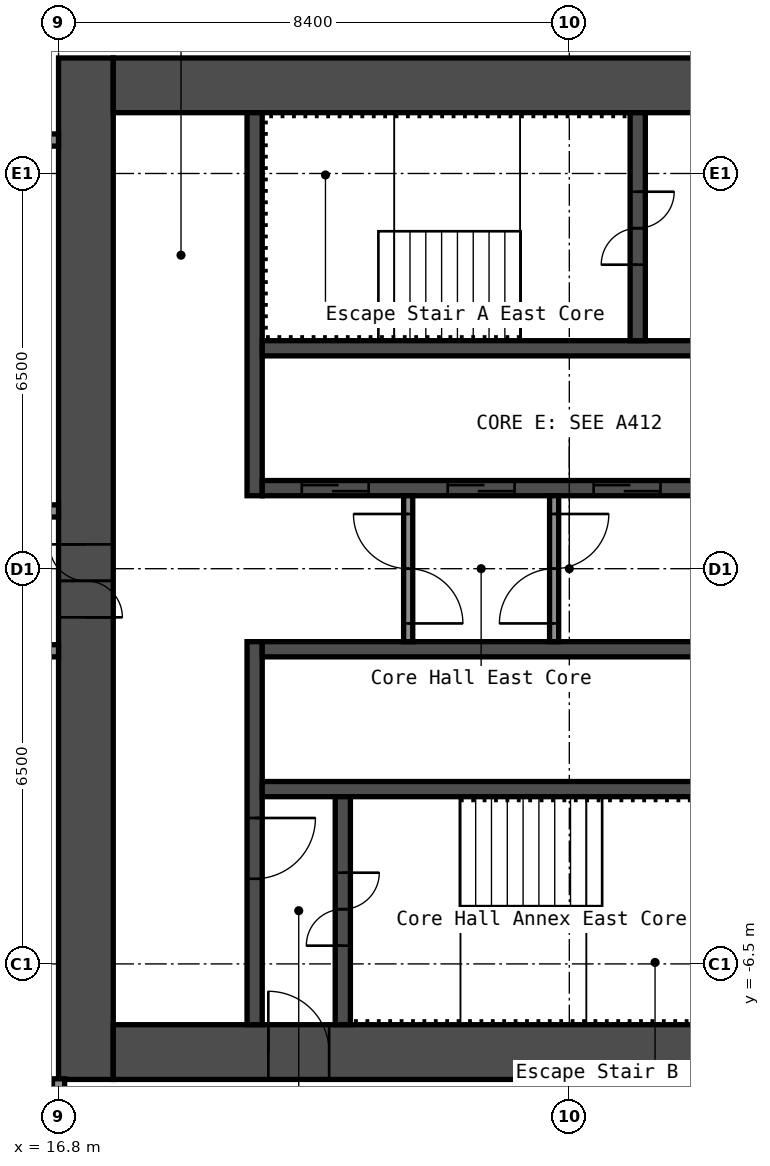
"""IFC4 building model, lengths in metres.
Left out: names, types, materials, properties, quantities, classifications, styles, units other than length and angle.
Written with IfcOpenShell. Run it as: python <this file> out.ifc"""

import sys

from ifc_helpers import new_model, si_unit, direction, frame, frame_2d, origin, place, context, subcontext, project, spatial, rectangle, extrude, element, fill, save


model = new_model("IFC4")
c1 = context("Model", 3, precision=1e-05, world=origin(), true_north=direction((0.0, 1.0)))
c2 = subcontext(c1, "Body", "Model", "MODEL_VIEW")
j1 = project(units=[si_unit("LENGTHUNIT", "METRE"), si_unit("PLANEANGLEUNIT", "RADIAN")], contexts=[c1])
p1 = place(None, origin())
s1 = spatial("IfcSite", under=j1, at=p1, CompositionType="ELEMENT")
p2 = place(p1, origin())
s2 = spatial("IfcBuilding", under=s1, at=p2, CompositionType="ELEMENT")
p3 = place(p2, frame((0.0, 0.0, 75.4)))
s3 = spatial("IfcBuildingStorey", under=s2, at=p3, CompositionType="ELEMENT", Elevation=75.4)
p4 = place(p3, frame((17.25, -8.4, 0.0), z_axis=(0.0, 0.0, 1.0), x_axis=(0.0, 1.0, 0.0)))
e1 = element("IfcWall", 1, at=p4, inside=s3, PredefinedType="SHEAR", context=c2, shape_type="SweptSolid", body=[
    extrude(rectangle(XDim=16.8, YDim=0.9, at=frame_2d((8.4, 0.0))), origin(), (0.0, 0.0, 1.0), 2.8),
])
p5 = place(p4, frame((7.6, 0.0, 0.0)))
e2 = element("IfcOpeningElement", 2, at=p5, cuts=e1, PredefinedType="OPENING", context=c2, shape_type="SweptSolid", body=[
    extrude(rectangle(XDim=1.2, YDim=2.1, at=frame_2d((0.6, 1.05))), frame((0.0, 0.46, 0.0), z_axis=(0.0, -1.0, 0.0), x_axis=(1.0, 0.0, 0.0)), (0.0, 0.0, 1.0), 0.92),
])
p6 = place(p3, frame((17.7, 7.95, 0.0), z_axis=(0.0, 0.0, 1.0), x_axis=(1.0, 0.0, 0.0)))
e3 = element("IfcWall", 3, at=p6, inside=s3, PredefinedType="SHEAR", context=c2, shape_type="SweptSolid", body=[
    extrude(rectangle(XDim=15.0, YDim=0.9, at=frame_2d((7.5, 0.0))), origin(), (0.0, 0.0, 1.0), 2.8),
])
p7 = place(p6, frame((10.4, 0.0, 0.0)))
e4 = element("IfcOpeningElement", 4, at=p7, cuts=e3, PredefinedType="OPENING", context=c2, shape_type="SweptSolid", body=[
    extrude(rectangle(XDim=1.2, YDim=2.1, at=frame_2d((0.6, 1.05))), frame((0.0, 0.46, 0.0), z_axis=(0.0, -1.0, 0.0), x_axis=(1.0, 0.0, 0.0)), (0.0, 0.0, 1.0), 0.92),
])
p8 = place(p6, frame((13.35, 0.0, 0.0)))
e5 = element("IfcOpeningElement", 5, at=p8, cuts=e3, PredefinedType="OPENING", context=c2, shape_type="SweptSolid", body=[
    extrude(rectangle(XDim=0.9, YDim=2.1, at=frame_2d((0.45, 1.05))), frame((0.0, 0.46, 0.0), z_axis=(0.0, -1.0, 0.0), x_axis=(1.0, 0.0, 0.0)), (0.0, 0.0, 1.0), 0.92),
])
p9 = place(p3, frame((17.7, -7.95, 0.0), z_axis=(0.0, 0.0, 1.0), x_axis=(1.0, 0.0, 0.0)))
e6 = element("IfcWall", 6, at=p9, inside=s3, PredefinedType="SHEAR", context=c2, shape_type="SweptSolid", body=[
    extrude(rectangle(XDim=15.0, YDim=0.9, at=frame_2d((7.5, 0.0))), origin(), (0.0, 0.0, 1.0), 2.8),
])
p10 = place(p9, frame((2.55, 0.0, 0.0)))
e7 = element("IfcOpeningElement", 7, at=p10, cuts=e6, PredefinedType="OPENING", context=c2, shape_type="SweptSolid", body=[
    extrude(rectangle(XDim=1.0, YDim=2.1, at=frame_2d((0.5, 1.05))), frame((0.0, 0.46, 0.0), z_axis=(0.0, -1.0, 0.0), x_axis=(1.0, 0.0, 0.0)), (0.0, 0.0, 1.0), 0.92),
])
p11 = place(p3, frame((20.025, 1.2, 0.0), z_axis=(0.0, 0.0, 1.0), x_axis=(0.0, 1.0, 0.0)))
e8 = element("IfcWall", 8, at=p11, inside=s3, PredefinedType="SHEAR", context=c2, shape_type="SweptSolid", body=[
    extrude(rectangle(XDim=6.3, YDim=0.25, at=frame_2d((3.15, 0.0))), origin(), (0.0, 0.0, 1.0), 2.8),
])
p12 = place(p3, frame((20.025, -7.5, 0.0), z_axis=(0.0, 0.0, 1.0), x_axis=(0.0, 1.0, 0.0)))
e9 = element("IfcWall", 9, at=p12, inside=s3, PredefinedType="SHEAR", context=c2, shape_type="SweptSolid", body=[
    extrude(rectangle(XDim=6.3, YDim=0.25, at=frame_2d((3.15, 0.0))), origin(), (0.0, 0.0, 1.0), 2.8),
])
p13 = place(p12, frame((2.4, 0.0, 0.0)))
e10 = element("IfcOpeningElement", 10, at=p13, cuts=e9, PredefinedType="OPENING", context=c2, shape_type="SweptSolid", body=[
    extrude(rectangle(XDim=1.0, YDim=2.1, at=frame_2d((0.5, 1.05))), frame((0.0, 0.135, 0.0), z_axis=(0.0, -1.0, 0.0), x_axis=(1.0, 0.0, 0.0)), (0.0, 0.0, 1.0), 0.27),
])
p14 = place(p3, frame((20.15, 1.325, 0.0), z_axis=(0.0, 0.0, 1.0), x_axis=(1.0, 0.0, 0.0)))
e11 = element("IfcWall", 11, at=p14, inside=s3, PredefinedType="SHEAR", context=c2, shape_type="SweptSolid", body=[
    extrude(rectangle(XDim=7.5, YDim=0.25, at=frame_2d((3.75, 0.0))), origin(), (0.0, 0.0, 1.0), 2.8),
])
p15 = place(p14, frame((0.65, 0.0, 0.0)))
e12 = element("IfcOpeningElement", 12, at=p15, cuts=e11, PredefinedType="OPENING", context=c2, shape_type="SweptSolid", body=[
    extrude(rectangle(XDim=1.1, YDim=2.1, at=frame_2d((0.55, 1.05))), frame((0.0, 0.135, 0.0), z_axis=(0.0, -1.0, 0.0), x_axis=(1.0, 0.0, 0.0)), (0.0, 0.0, 1.0), 0.27),
])
p16 = place(p14, frame((3.05, 0.0, 0.0)))
e13 = element("IfcOpeningElement", 13, at=p16, cuts=e11, PredefinedType="OPENING", context=c2, shape_type="SweptSolid", body=[
    extrude(rectangle(XDim=1.1, YDim=2.1, at=frame_2d((0.55, 1.05))), frame((0.0, 0.135, 0.0), z_axis=(0.0, -1.0, 0.0), x_axis=(1.0, 0.0, 0.0)), (0.0, 0.0, 1.0), 0.27),
])
p17 = place(p14, frame((5.45, 0.0, 0.0)))
e14 = element("IfcOpeningElement", 14, at=p17, cuts=e11, PredefinedType="OPENING", context=c2, shape_type="SweptSolid", body=[
    extrude(rectangle(XDim=1.1, YDim=2.1, at=frame_2d((0.55, 1.05))), frame((0.0, 0.135, 0.0), z_axis=(0.0, -1.0, 0.0), x_axis=(1.0, 0.0, 0.0)), (0.0, 0.0, 1.0), 0.27),
])
p18 = place(p3, frame((20.15, 3.625, 0.0), z_axis=(0.0, 0.0, 1.0), x_axis=(1.0, 0.0, 0.0)))
e15 = element("IfcWall", 15, at=p18, inside=s3, PredefinedType="SHEAR", context=c2, shape_type="SweptSolid", body=[
    extrude(rectangle(XDim=7.5, YDim=0.25, at=frame_2d((3.75, 0.0))), origin(), (0.0, 0.0, 1.0), 2.8),
])
p19 = place(p3, frame((26.325, 3.75, 0.0), z_axis=(0.0, 0.0, 1.0), x_axis=(0.0, 1.0, 0.0)))
e16 = element("IfcWall", 16, at=p19, inside=s3, PredefinedType="SHEAR", context=c2, shape_type="SweptSolid", body=[
    extrude(rectangle(XDim=3.75, YDim=0.25, at=frame_2d((1.875, 0.0))), origin(), (0.0, 0.0, 1.0), 2.8),
])
p20 = place(p19, frame((1.25, 0.0, 0.0)))
e17 = element("IfcOpeningElement", 17, at=p20, cuts=e16, PredefinedType="OPENING", context=c2, shape_type="SweptSolid", body=[
    extrude(rectangle(XDim=1.2, YDim=2.1, at=frame_2d((0.6, 1.05))), frame((0.0, 0.135, 0.0), z_axis=(0.0, -1.0, 0.0), x_axis=(1.0, 0.0, 0.0)), (0.0, 0.0, 1.0), 0.27),
])
for number, where, z_axis, x_axis in (
    (18, (20.15, -1.325, 0.0), (0.0, 0.0, 1.0), (1.0, 0.0, 0.0)),
    (19, (20.15, -3.625, 0.0), (0.0, 0.0, 1.0), (1.0, 0.0, 0.0)),
):
    element("IfcWall", number, at=place(p3, frame(where, z_axis=z_axis, x_axis=x_axis)), inside=s3, PredefinedType="SHEAR", context=c2, shape_type="SweptSolid", body=[
        extrude(rectangle(XDim=7.5, YDim=0.25, at=frame_2d((3.75, 0.0))), origin(), (0.0, 0.0, 1.0), 2.8),
    ])
p21 = place(p3, frame((21.475, -7.5, 0.0), z_axis=(0.0, 0.0, 1.0), x_axis=(0.0, 1.0, 0.0)))
e20 = element("IfcWall", 20, at=p21, inside=s3, PredefinedType="SHEAR", context=c2, shape_type="SweptSolid", body=[
    extrude(rectangle(XDim=3.75, YDim=0.25, at=frame_2d((1.875, 0.0))), origin(), (0.0, 0.0, 1.0), 2.8),
])
p22 = place(p21, frame((1.3, 0.0, 0.0)))
e21 = element("IfcOpeningElement", 21, at=p22, cuts=e20, PredefinedType="OPENING", context=c2, shape_type="SweptSolid", body=[
    extrude(rectangle(XDim=1.2, YDim=2.1, at=frame_2d((0.6, 1.05))), frame((0.0, 0.135, 0.0), z_axis=(0.0, -1.0, 0.0), x_axis=(1.0, 0.0, 0.0)), (0.0, 0.0, 1.0), 0.27),
])
p23 = place(p3, frame((22.55, -1.2, 0.0), z_axis=(0.0, 0.0, 1.0), x_axis=(0.0, 1.0, 0.0)))
e22 = element("IfcWall", 22, at=p23, inside=s3, PredefinedType="PARTITIONING", context=c2, shape_type="SweptSolid", body=[
    extrude(rectangle(XDim=2.4, YDim=0.15, at=frame_2d((1.2, 0.0))), origin(), (0.0, 0.0, 1.0), 2.8),
])
p24 = place(p23, frame((0.3, 0.0, 0.0)))
e23 = element("IfcOpeningElement", 23, at=p24, cuts=e22, PredefinedType="OPENING", context=c2, shape_type="SweptSolid", body=[
    extrude(rectangle(XDim=1.8, YDim=2.1, at=frame_2d((0.9, 1.05))), frame((0.0, 0.085, 0.0), z_axis=(0.0, -1.0, 0.0), x_axis=(1.0, 0.0, 0.0)), (0.0, 0.0, 1.0), 0.17),
])
p25 = place(p3, frame((24.95, -1.2, 0.0), z_axis=(0.0, 0.0, 1.0), x_axis=(0.0, 1.0, 0.0)))
e24 = element("IfcWall", 24, at=p25, inside=s3, PredefinedType="PARTITIONING", context=c2, shape_type="SweptSolid", body=[
    extrude(rectangle(XDim=2.4, YDim=0.15, at=frame_2d((1.2, 0.0))), origin(), (0.0, 0.0, 1.0), 2.8),
])
p26 = place(p25, frame((0.3, 0.0, 0.0)))
e25 = element("IfcOpeningElement", 25, at=p26, cuts=e24, PredefinedType="OPENING", context=c2, shape_type="SweptSolid", body=[
    extrude(rectangle(XDim=1.8, YDim=2.1, at=frame_2d((0.9, 1.05))), frame((0.0, 0.085, 0.0), z_axis=(0.0, -1.0, 0.0), x_axis=(1.0, 0.0, 0.0)), (0.0, 0.0, 1.0), 0.17),
])
p27 = place(p3, frame((-16.8, -1.35, 0.0), z_axis=(0.0, 0.0, 1.0), x_axis=(1.0, 0.0, 0.0)))
e26 = element("IfcWall", 26, at=p27, inside=s3, PredefinedType="PARTITIONING", context=c2, shape_type="SweptSolid", body=[
    extrude(rectangle(XDim=33.6, YDim=0.2, at=frame_2d((16.8, 0.0))), origin(), (0.0, 0.0, 1.0), 2.8),
])
p28 = place(p27, frame((1.9, 0.0, 0.0)))
e27 = element("IfcOpeningElement", 27, at=p28, cuts=e26, PredefinedType="OPENING", context=c2, shape_type="SweptSolid", body=[
    extrude(rectangle(XDim=1.0, YDim=2.1, at=frame_2d((0.5, 1.05))), frame((0.0, 0.11, 0.0), z_axis=(0.0, -1.0, 0.0), x_axis=(1.0, 0.0, 0.0)), (0.0, 0.0, 1.0), 0.22),
])
p29 = place(p27, frame((9.63, 0.0, 0.0)))
e28 = element("IfcOpeningElement", 28, at=p29, cuts=e26, PredefinedType="OPENING", context=c2, shape_type="SweptSolid", body=[
    extrude(rectangle(XDim=0.9, YDim=2.1, at=frame_2d((0.45, 1.05))), frame((0.0, 0.11, 0.0), z_axis=(0.0, -1.0, 0.0), x_axis=(1.0, 0.0, 0.0)), (0.0, 0.0, 1.0), 0.22),
])
p30 = place(p27, frame((13.83, 0.0, 0.0)))
e29 = element("IfcOpeningElement", 29, at=p30, cuts=e26, PredefinedType="OPENING", context=c2, shape_type="SweptSolid", body=[
    extrude(rectangle(XDim=0.9, YDim=2.1, at=frame_2d((0.45, 1.05))), frame((0.0, 0.11, 0.0), z_axis=(0.0, -1.0, 0.0), x_axis=(1.0, 0.0, 0.0)), (0.0, 0.0, 1.0), 0.22),
])
p31 = place(p27, frame((22.2, 0.0, 0.0)))
e30 = element("IfcOpeningElement", 30, at=p31, cuts=e26, PredefinedType="OPENING", context=c2, shape_type="SweptSolid", body=[
    extrude(rectangle(XDim=1.0, YDim=2.1, at=frame_2d((0.5, 1.05))), frame((0.0, 0.11, 0.0), z_axis=(0.0, -1.0, 0.0), x_axis=(1.0, 0.0, 0.0)), (0.0, 0.0, 1.0), 0.22),
])
p32 = place(p27, frame((30.6, 0.0, 0.0)))
e31 = element("IfcOpeningElement", 31, at=p32, cuts=e26, PredefinedType="OPENING", context=c2, shape_type="SweptSolid", body=[
    extrude(rectangle(XDim=1.0, YDim=2.1, at=frame_2d((0.5, 1.05))), frame((0.0, 0.11, 0.0), z_axis=(0.0, -1.0, 0.0), x_axis=(1.0, 0.0, 0.0)), (0.0, 0.0, 1.0), 0.22),
])
p33 = place(p3, frame((-16.8, 0.95, 0.0), z_axis=(0.0, 0.0, 1.0), x_axis=(1.0, 0.0, 0.0)))
e32 = element("IfcWall", 32, at=p33, inside=s3, PredefinedType="PARTITIONING", context=c2, shape_type="SweptSolid", body=[
    extrude(rectangle(XDim=33.6, YDim=0.2, at=frame_2d((16.8, 0.0))), origin(), (0.0, 0.0, 1.0), 2.8),
])
p34 = place(p33, frame((10.22, 0.0, 0.0)))
e33 = element("IfcOpeningElement", 33, at=p34, cuts=e32, PredefinedType="OPENING", context=c2, shape_type="SweptSolid", body=[
    extrude(rectangle(XDim=0.9, YDim=2.1, at=frame_2d((0.45, 1.05))), frame((0.0, 0.11, 0.0), z_axis=(0.0, -1.0, 0.0), x_axis=(1.0, 0.0, 0.0)), (0.0, 0.0, 1.0), 0.22),
])
p35 = place(p33, frame((14.42, 0.0, 0.0)))
e34 = element("IfcOpeningElement", 34, at=p35, cuts=e32, PredefinedType="OPENING", context=c2, shape_type="SweptSolid", body=[
    extrude(rectangle(XDim=0.9, YDim=2.1, at=frame_2d((0.45, 1.05))), frame((0.0, 0.11, 0.0), z_axis=(0.0, -1.0, 0.0), x_axis=(1.0, 0.0, 0.0)), (0.0, 0.0, 1.0), 0.22),
])
p36 = place(p33, frame((27.27, 0.0, 0.0)))
e35 = element("IfcOpeningElement", 35, at=p36, cuts=e32, PredefinedType="OPENING", context=c2, shape_type="SweptSolid", body=[
    extrude(rectangle(XDim=0.9, YDim=2.1, at=frame_2d((0.45, 1.05))), frame((0.0, 0.11, 0.0), z_axis=(0.0, -1.0, 0.0), x_axis=(1.0, 0.0, 0.0)), (0.0, 0.0, 1.0), 0.22),
])
p37 = place(p33, frame((31.47, 0.0, 0.0)))
e36 = element("IfcOpeningElement", 36, at=p37, cuts=e32, PredefinedType="OPENING", context=c2, shape_type="SweptSolid", body=[
    extrude(rectangle(XDim=0.9, YDim=2.1, at=frame_2d((0.45, 1.05))), frame((0.0, 0.11, 0.0), z_axis=(0.0, -1.0, 0.0), x_axis=(1.0, 0.0, 0.0)), (0.0, 0.0, 1.0), 0.22),
])
p38 = place(p3, frame((-16.8, 7.05, 0.0), z_axis=(0.0, 0.0, 1.0), x_axis=(1.0, 0.0, 0.0)))
e37 = element("IfcWall", 37, at=p38, inside=s3, PredefinedType="PARTITIONING", context=c2, shape_type="SweptSolid", body=[
    extrude(rectangle(XDim=33.6, YDim=0.2, at=frame_2d((16.8, 0.0))), origin(), (0.0, 0.0, 1.0), 2.8),
])
p39 = place(p38, frame((2.155, 0.0, 0.0)))
e38 = element("IfcOpeningElement", 38, at=p39, cuts=e37, PredefinedType="OPENING", context=c2, shape_type="SweptSolid", body=[
    extrude(rectangle(XDim=0.9, YDim=2.1, at=frame_2d((0.45, 1.05))), frame((0.0, 0.11, 0.0), z_axis=(0.0, -1.0, 0.0), x_axis=(1.0, 0.0, 0.0)), (0.0, 0.0, 1.0), 0.22),
])
p40 = place(p38, frame((6.355, 0.0, 0.0)))
e39 = element("IfcOpeningElement", 39, at=p40, cuts=e37, PredefinedType="OPENING", context=c2, shape_type="SweptSolid", body=[
    extrude(rectangle(XDim=0.9, YDim=2.1, at=frame_2d((0.45, 1.05))), frame((0.0, 0.11, 0.0), z_axis=(0.0, -1.0, 0.0), x_axis=(1.0, 0.0, 0.0)), (0.0, 0.0, 1.0), 0.22),
])
p41 = place(p38, frame((18.28, 0.0, 0.0)))
e40 = element("IfcOpeningElement", 40, at=p41, cuts=e37, PredefinedType="OPENING", context=c2, shape_type="SweptSolid", body=[
    extrude(rectangle(XDim=0.9, YDim=2.1, at=frame_2d((0.45, 1.05))), frame((0.0, 0.11, 0.0), z_axis=(0.0, -1.0, 0.0), x_axis=(1.0, 0.0, 0.0)), (0.0, 0.0, 1.0), 0.22),
])
p42 = place(p38, frame((22.48, 0.0, 0.0)))
e41 = element("IfcOpeningElement", 41, at=p42, cuts=e37, PredefinedType="OPENING", context=c2, shape_type="SweptSolid", body=[
    extrude(rectangle(XDim=0.9, YDim=2.1, at=frame_2d((0.45, 1.05))), frame((0.0, 0.11, 0.0), z_axis=(0.0, -1.0, 0.0), x_axis=(1.0, 0.0, 0.0)), (0.0, 0.0, 1.0), 0.22),
])
p43 = place(p3, frame((16.8, -15.55, 0.0), z_axis=(0.0, 0.0, 1.0), x_axis=(0.0, 1.0, 0.0)))
e42 = element("IfcWall", 42, at=p43, inside=s3, PredefinedType="PARTITIONING", context=c2, shape_type="SweptSolid", body=[
    extrude(rectangle(XDim=7.16, YDim=0.2, at=frame_2d((3.58, 0.0))), origin(), (0.0, 0.0, 1.0), 2.8),
])
p44 = place(p5, origin())
e43 = element("IfcDoor", 43, at=p44, inside=s3, OperationType="DOUBLE_DOOR_SINGLE_SWING", PredefinedType="DOOR", context=c2, shape_type="SweptSolid", body=[
    extrude(rectangle(XDim=1.2, YDim=2.1, at=frame_2d((0.6, 1.05))), frame((0.0, 0.025, 0.0), z_axis=(0.0, -1.0, 0.0), x_axis=(1.0, 0.0, 0.0)), (0.0, 0.0, 1.0), 0.05),
])
fill(e2, e43)
p45 = place(p10, origin())
e44 = element("IfcDoor", 44, at=p45, inside=s3, OperationType="SINGLE_SWING_RIGHT", PredefinedType="DOOR", context=c2, shape_type="SweptSolid", body=[
    extrude(rectangle(XDim=1.0, YDim=2.1, at=frame_2d((0.5, 1.05))), frame((0.0, 0.025, 0.0), z_axis=(0.0, -1.0, 0.0), x_axis=(1.0, 0.0, 0.0)), (0.0, 0.0, 1.0), 0.05),
])
fill(e7, e44)
p46 = place(p20, origin())
e45 = element("IfcDoor", 45, at=p46, inside=s3, OperationType="DOUBLE_DOOR_SINGLE_SWING", PredefinedType="DOOR", context=c2, shape_type="SweptSolid", body=[
    extrude(rectangle(XDim=1.2, YDim=2.1, at=frame_2d((0.6, 1.05))), frame((0.0, 0.025, 0.0), z_axis=(0.0, -1.0, 0.0), x_axis=(1.0, 0.0, 0.0)), (0.0, 0.0, 1.0), 0.05),
])
fill(e17, e45)
p47 = place(p22, origin())
e46 = element("IfcDoor", 46, at=p47, inside=s3, OperationType="DOUBLE_DOOR_SINGLE_SWING", PredefinedType="DOOR", context=c2, shape_type="SweptSolid", body=[
    extrude(rectangle(XDim=1.2, YDim=2.1, at=frame_2d((0.6, 1.05))), frame((0.0, 0.025, 0.0), z_axis=(0.0, -1.0, 0.0), x_axis=(1.0, 0.0, 0.0)), (0.0, 0.0, 1.0), 0.05),
])
fill(e21, e46)
p48 = place(p13, origin())
e47 = element("IfcDoor", 47, at=p48, inside=s3, OperationType="SINGLE_SWING_RIGHT", PredefinedType="DOOR", context=c2, shape_type="SweptSolid", body=[
    extrude(rectangle(XDim=1.0, YDim=2.1, at=frame_2d((0.5, 1.05))), frame((0.0, 0.025, 0.0), z_axis=(0.0, -1.0, 0.0), x_axis=(1.0, 0.0, 0.0)), (0.0, 0.0, 1.0), 0.05),
])
fill(e10, e47)
p49 = place(p24, origin())
e48 = element("IfcDoor", 48, at=p49, inside=s3, OperationType="DOUBLE_DOOR_SINGLE_SWING", PredefinedType="DOOR", context=c2, shape_type="SweptSolid", body=[
    extrude(rectangle(XDim=1.8, YDim=2.1, at=frame_2d((0.9, 1.05))), frame((0.0, 0.025, 0.0), z_axis=(0.0, -1.0, 0.0), x_axis=(1.0, 0.0, 0.0)), (0.0, 0.0, 1.0), 0.05),
])
fill(e23, e48)
p50 = place(p26, origin())
e49 = element("IfcDoor", 49, at=p50, inside=s3, OperationType="DOUBLE_DOOR_SINGLE_SWING", PredefinedType="DOOR", context=c2, shape_type="SweptSolid", body=[
    extrude(rectangle(XDim=1.8, YDim=2.1, at=frame_2d((0.9, 1.05))), frame((0.0, 0.025, 0.0), z_axis=(0.0, -1.0, 0.0), x_axis=(1.0, 0.0, 0.0)), (0.0, 0.0, 1.0), 0.05),
])
fill(e25, e49)
p51 = place(p15, origin())
e50 = element("IfcDoor", 50, at=p51, inside=s3, OperationType="DOUBLE_DOOR_SLIDING", PredefinedType="DOOR", context=c2, shape_type="SweptSolid", body=[
    extrude(rectangle(XDim=1.1, YDim=2.1, at=frame_2d((0.55, 1.05))), frame((0.0, 0.025, 0.0), z_axis=(0.0, -1.0, 0.0), x_axis=(1.0, 0.0, 0.0)), (0.0, 0.0, 1.0), 0.05),
])
fill(e12, e50)
p52 = place(p16, origin())
e51 = element("IfcDoor", 51, at=p52, inside=s3, OperationType="DOUBLE_DOOR_SLIDING", PredefinedType="DOOR", context=c2, shape_type="SweptSolid", body=[
    extrude(rectangle(XDim=1.1, YDim=2.1, at=frame_2d((0.55, 1.05))), frame((0.0, 0.025, 0.0), z_axis=(0.0, -1.0, 0.0), x_axis=(1.0, 0.0, 0.0)), (0.0, 0.0, 1.0), 0.05),
])
fill(e13, e51)
p53 = place(p17, origin())
e52 = element("IfcDoor", 52, at=p53, inside=s3, OperationType="DOUBLE_DOOR_SLIDING", PredefinedType="DOOR", context=c2, shape_type="SweptSolid", body=[
    extrude(rectangle(XDim=1.1, YDim=2.1, at=frame_2d((0.55, 1.05))), frame((0.0, 0.025, 0.0), z_axis=(0.0, -1.0, 0.0), x_axis=(1.0, 0.0, 0.0)), (0.0, 0.0, 1.0), 0.05),
])
fill(e14, e52)
save(model, sys.argv[1])
